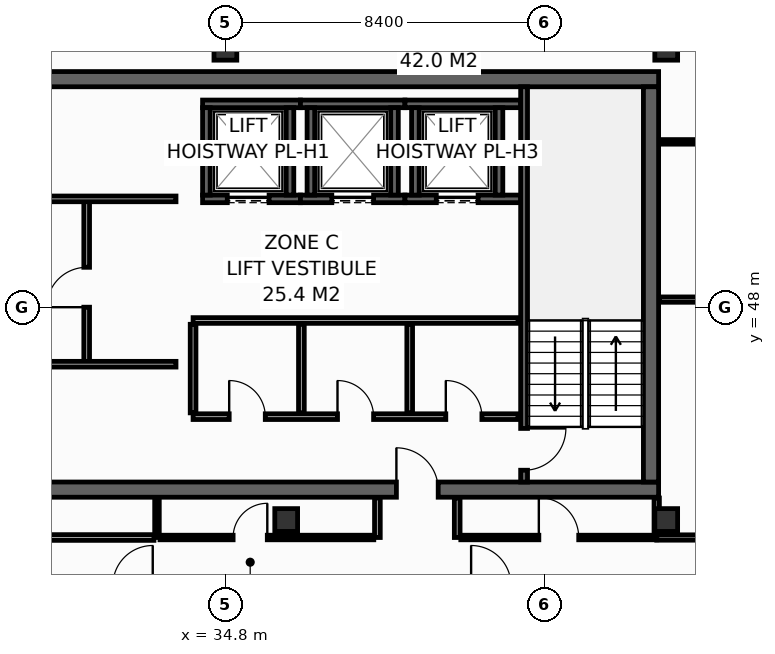
"""IFC4 building model, lengths in metres.
Left out: names, types, materials, properties, quantities, classifications, styles, units other than length and angle.
Written with IfcOpenShell. Run it as: python <this file> out.ifc"""

import sys

from ifc_helpers import new_model, si_unit, direction, frame, frame_2d, origin, origin_2d, place, context, subcontext, project, spatial, rectangle, hollow_rectangle, extrude, element, fill, save


model = new_model("IFC4")
c1 = context("Model", 3, precision=1e-05, world=origin(), true_north=direction((0.0, 1.0)))
c2 = subcontext(c1, "Body", "Model", "MODEL_VIEW")
j1 = project(units=[si_unit("LENGTHUNIT", "METRE"), si_unit("PLANEANGLEUNIT", "RADIAN")], contexts=[c1])
p1 = place(None, origin())
s1 = spatial("IfcSite", under=j1, at=p1, CompositionType="ELEMENT")
p2 = place(p1, origin())
s2 = spatial("IfcBuilding", under=s1, at=p2, CompositionType="ELEMENT")
p3 = place(p2, frame((0.0, 0.0, 295.2)))
s3 = spatial("IfcBuildingStorey", under=s2, at=p3, CompositionType="ELEMENT", Elevation=295.2)
p4 = place(p3, frame((13.7, 43.2, 0.0), z_axis=(0.0, 0.0, 1.0), x_axis=(1.0, 0.0, 0.0)))
e1 = element("IfcWall", 1, at=p4, inside=s3, PredefinedType="SHEAR", context=c2, shape_type="SweptSolid", body=[
    extrude(rectangle(XDim=32.5, YDim=0.4, at=frame_2d((16.25, 0.0))), origin(), (0.0, 0.0, 1.0), 3.55),
])
p5 = place(p4, frame((5.4, 0.0, 0.0)))
e2 = element("IfcOpeningElement", 2, at=p5, cuts=e1, PredefinedType="OPENING", context=c2, shape_type="SweptSolid", body=[
    extrude(rectangle(XDim=1.1, YDim=2.15, at=frame_2d((0.55, 1.075))), frame((0.0, 0.21, 0.0), z_axis=(0.0, -1.0, 0.0), x_axis=(1.0, 0.0, 0.0)), (0.0, 0.0, 1.0), 0.42),
])
p6 = place(p4, frame((25.6, 0.0, 0.0)))
e3 = element("IfcOpeningElement", 3, at=p6, cuts=e1, PredefinedType="OPENING", context=c2, shape_type="SweptSolid", body=[
    extrude(rectangle(XDim=1.1, YDim=2.15, at=frame_2d((0.55, 1.075))), frame((0.0, 0.21, 0.0), z_axis=(0.0, -1.0, 0.0), x_axis=(1.0, 0.0, 0.0)), (0.0, 0.0, 1.0), 0.42),
])
p7 = place(p3, frame((13.7, 54.0, 0.0), z_axis=(0.0, 0.0, 1.0), x_axis=(1.0, 0.0, 0.0)))
e4 = element("IfcWall", 4, at=p7, inside=s3, PredefinedType="SHEAR", context=c2, shape_type="SweptSolid", body=[
    extrude(rectangle(XDim=32.5, YDim=0.4, at=frame_2d((16.25, 0.0))), origin(), (0.0, 0.0, 1.0), 3.55),
])
p8 = place(p3, frame((46.0, 43.4, 0.0), z_axis=(0.0, 0.0, 1.0), x_axis=(0.0, 1.0, 0.0)))
e5 = element("IfcWall", 5, at=p8, inside=s3, PredefinedType="SHEAR", context=c2, shape_type="SweptSolid", body=[
    extrude(rectangle(XDim=10.4, YDim=0.4, at=frame_2d((5.2, 0.0))), origin(), (0.0, 0.0, 1.0), 3.55),
])
for number, where, z_axis, x_axis in (
    (6, (34.8, 54.8, 0.0), (0.0, 0.0, 1.0), (1.0, 0.0, 0.0)),
    (7, (46.4, 54.8, 0.0), (0.0, 0.0, 1.0), (1.0, 0.0, 0.0)),
    (8, (36.4, 42.4, 0.0), (0.0, 0.0, 1.0), (1.0, 0.0, 0.0)),
    (9, (46.4, 42.4, 0.0), (0.0, 0.0, 1.0), (1.0, 0.0, 0.0)),
):
    element("IfcColumn", number, at=place(p3, frame(where, z_axis=z_axis, x_axis=x_axis)), inside=s3, PredefinedType="COLUMN", context=c2, shape_type="SweptSolid", body=[
        extrude(hollow_rectangle(XDim=0.6, YDim=0.6, WallThickness=0.028, at=origin_2d()), origin(), (0.0, 0.0, 1.0), 3.8),
    ])
p9 = place(p3, frame((34.2, 50.85, 0.0), z_axis=(0.0, 0.0, 1.0), x_axis=(1.0, 0.0, 0.0)))
e10 = element("IfcWall", 10, at=p9, inside=s3, PredefinedType="SHEAR", context=c2, shape_type="SweptSolid", body=[
    extrude(rectangle(XDim=2.575, YDim=0.2, at=frame_2d((1.288, 0.0))), origin(), (0.0, 0.0, 1.0), 3.55),
])
p10 = place(p9, frame((0.65, 0.0, 0.0)))
e11 = element("IfcOpeningElement", 11, at=p10, cuts=e10, PredefinedType="OPENING", context=c2, shape_type="SweptSolid", body=[
    extrude(rectangle(XDim=1.1, YDim=2.2, at=frame_2d((0.55, 1.1))), frame((0.0, 0.11, 0.0), z_axis=(0.0, -1.0, 0.0), x_axis=(1.0, 0.0, 0.0)), (0.0, 0.0, 1.0), 0.22),
])
p11 = place(p3, frame((34.2, 53.35, 0.0), z_axis=(0.0, 0.0, 1.0), x_axis=(1.0, 0.0, 0.0)))
e12 = element("IfcWall", 12, at=p11, inside=s3, PredefinedType="SHEAR", context=c2, shape_type="SweptSolid", body=[
    extrude(rectangle(XDim=2.575, YDim=0.2, at=frame_2d((1.288, 0.0))), origin(), (0.0, 0.0, 1.0), 3.55),
])
for number, where, z_axis, x_axis in (
    (13, (34.3, 50.95, 0.0), (0.0, 0.0, 1.0), (0.0, 1.0, 0.0)),
    (14, (36.5, 50.95, 0.0), (0.0, 0.0, 1.0), (0.0, 1.0, 0.0)),
):
    element("IfcWall", number, at=place(p3, frame(where, z_axis=z_axis, x_axis=x_axis)), inside=s3, PredefinedType="SHEAR", context=c2, shape_type="SweptSolid", body=[
        extrude(rectangle(XDim=2.3, YDim=0.2, at=frame_2d((1.15, 0.0))), origin(), (0.0, 0.0, 1.0), 3.55),
    ])
p12 = place(p3, frame((36.775, 50.85, 0.0), z_axis=(0.0, 0.0, 1.0), x_axis=(1.0, 0.0, 0.0)))
e15 = element("IfcWall", 15, at=p12, inside=s3, PredefinedType="SHEAR", context=c2, shape_type="SweptSolid", body=[
    extrude(rectangle(XDim=2.75, YDim=0.2, at=frame_2d((1.375, 0.0))), origin(), (0.0, 0.0, 1.0), 3.55),
])
p13 = place(p12, frame((0.825, 0.0, 0.0)))
e16 = element("IfcOpeningElement", 16, at=p13, cuts=e15, PredefinedType="OPENING", context=c2, shape_type="SweptSolid", body=[
    extrude(rectangle(XDim=1.1, YDim=2.2, at=frame_2d((0.55, 1.1))), frame((0.0, 0.11, 0.0), z_axis=(0.0, -1.0, 0.0), x_axis=(1.0, 0.0, 0.0)), (0.0, 0.0, 1.0), 0.22),
])
p14 = place(p3, frame((36.775, 53.35, 0.0), z_axis=(0.0, 0.0, 1.0), x_axis=(1.0, 0.0, 0.0)))
e17 = element("IfcWall", 17, at=p14, inside=s3, PredefinedType="SHEAR", context=c2, shape_type="SweptSolid", body=[
    extrude(rectangle(XDim=2.75, YDim=0.2, at=frame_2d((1.375, 0.0))), origin(), (0.0, 0.0, 1.0), 3.55),
])
for number, where, z_axis, x_axis in (
    (18, (37.05, 50.95, 0.0), (0.0, 0.0, 1.0), (0.0, 1.0, 0.0)),
    (19, (39.25, 50.95, 0.0), (0.0, 0.0, 1.0), (0.0, 1.0, 0.0)),
):
    element("IfcWall", number, at=place(p3, frame(where, z_axis=z_axis, x_axis=x_axis)), inside=s3, PredefinedType="SHEAR", context=c2, shape_type="SweptSolid", body=[
        extrude(rectangle(XDim=2.3, YDim=0.2, at=frame_2d((1.15, 0.0))), origin(), (0.0, 0.0, 1.0), 3.55),
    ])
p15 = place(p3, frame((39.525, 50.85, 0.0), z_axis=(0.0, 0.0, 1.0), x_axis=(1.0, 0.0, 0.0)))
e20 = element("IfcWall", 20, at=p15, inside=s3, PredefinedType="SHEAR", context=c2, shape_type="SweptSolid", body=[
    extrude(rectangle(XDim=3.045, YDim=0.2, at=frame_2d((1.522, 0.0))), origin(), (0.0, 0.0, 1.0), 3.55),
])
p16 = place(p15, frame((0.825, 0.0, 0.0)))
e21 = element("IfcOpeningElement", 21, at=p16, cuts=e20, PredefinedType="OPENING", context=c2, shape_type="SweptSolid", body=[
    extrude(rectangle(XDim=1.1, YDim=2.2, at=frame_2d((0.55, 1.1))), frame((0.0, 0.11, 0.0), z_axis=(0.0, -1.0, 0.0), x_axis=(1.0, 0.0, 0.0)), (0.0, 0.0, 1.0), 0.22),
])
p17 = place(p3, frame((39.525, 53.35, 0.0), z_axis=(0.0, 0.0, 1.0), x_axis=(1.0, 0.0, 0.0)))
e22 = element("IfcWall", 22, at=p17, inside=s3, PredefinedType="SHEAR", context=c2, shape_type="SweptSolid", body=[
    extrude(rectangle(XDim=3.045, YDim=0.2, at=frame_2d((1.522, 0.0))), origin(), (0.0, 0.0, 1.0), 3.55),
])
for number, where, z_axis, x_axis in (
    (23, (39.8, 50.95, 0.0), (0.0, 0.0, 1.0), (0.0, 1.0, 0.0)),
    (24, (42.0, 50.95, 0.0), (0.0, 0.0, 1.0), (0.0, 1.0, 0.0)),
):
    element("IfcWall", number, at=place(p3, frame(where, z_axis=z_axis, x_axis=x_axis)), inside=s3, PredefinedType="SHEAR", context=c2, shape_type="SweptSolid", body=[
        extrude(rectangle(XDim=2.3, YDim=0.2, at=frame_2d((1.15, 0.0))), origin(), (0.0, 0.0, 1.0), 3.55),
    ])
p18 = place(p3, frame((42.66, 53.8, 0.0), z_axis=(0.0, 0.0, 1.0), x_axis=(0.0, -1.0, 0.0)))
e25 = element("IfcWall", 25, at=p18, inside=s3, PredefinedType="SHEAR", context=c2, shape_type="SweptSolid", body=[
    extrude(rectangle(XDim=10.4, YDim=0.18, at=frame_2d((5.2, 0.0))), origin(), (0.0, 0.0, 1.0), 3.55),
])
p19 = place(p18, frame((8.99, 0.0, 0.0)))
e26 = element("IfcOpeningElement", 26, at=p19, cuts=e25, PredefinedType="OPENING", context=c2, shape_type="SweptSolid", body=[
    extrude(rectangle(XDim=1.1, YDim=2.15, at=frame_2d((0.55, 1.075))), frame((0.0, 0.1, 0.0), z_axis=(0.0, -1.0, 0.0), x_axis=(1.0, 0.0, 0.0)), (0.0, 0.0, 1.0), 0.2),
])
p20 = place(p3, frame((31.15, 46.5, 0.0), z_axis=(0.0, 0.0, 1.0), x_axis=(0.0, 1.0, 0.0)))
e27 = element("IfcWall", 27, at=p20, inside=s3, PredefinedType="PARTITIONING", context=c2, shape_type="SweptSolid", body=[
    extrude(rectangle(XDim=4.35, YDim=0.15, at=frame_2d((2.175, 0.0))), origin(), (0.0, 0.0, 1.0), 3.55),
])
p21 = place(p20, frame((1.5, 0.0, 0.0)))
e28 = element("IfcOpeningElement", 28, at=p21, cuts=e27, PredefinedType="OPENING", context=c2, shape_type="SweptSolid", body=[
    extrude(rectangle(XDim=1.05, YDim=2.15, at=frame_2d((0.525, 1.075))), frame((0.0, 0.085, 0.0), z_axis=(0.0, -1.0, 0.0), x_axis=(1.0, 0.0, 0.0)), (0.0, 0.0, 1.0), 0.17),
])
p22 = place(p3, frame((33.95, 45.12, 0.0), z_axis=(0.0, 0.0, 1.0), x_axis=(1.0, 0.0, 0.0)))
e29 = element("IfcWall", 29, at=p22, inside=s3, PredefinedType="PARTITIONING", context=c2, shape_type="SweptSolid", body=[
    extrude(rectangle(XDim=8.55, YDim=0.15, at=frame_2d((4.275, 0.0))), origin(), (0.0, 0.0, 1.0), 3.55),
])
p23 = place(p22, frame((0.95, 0.0, 0.0)))
e30 = element("IfcOpeningElement", 30, at=p23, cuts=e29, PredefinedType="OPENING", context=c2, shape_type="SweptSolid", body=[
    extrude(rectangle(XDim=0.95, YDim=2.15, at=frame_2d((0.475, 1.075))), frame((0.0, 0.085, 0.0), z_axis=(0.0, -1.0, 0.0), x_axis=(1.0, 0.0, 0.0)), (0.0, 0.0, 1.0), 0.17),
])
p24 = place(p22, frame((3.8, 0.0, 0.0)))
e31 = element("IfcOpeningElement", 31, at=p24, cuts=e29, PredefinedType="OPENING", context=c2, shape_type="SweptSolid", body=[
    extrude(rectangle(XDim=0.95, YDim=2.15, at=frame_2d((0.475, 1.075))), frame((0.0, 0.085, 0.0), z_axis=(0.0, -1.0, 0.0), x_axis=(1.0, 0.0, 0.0)), (0.0, 0.0, 1.0), 0.17),
])
p25 = place(p22, frame((6.65, 0.0, 0.0)))
e32 = element("IfcOpeningElement", 32, at=p25, cuts=e29, PredefinedType="OPENING", context=c2, shape_type="SweptSolid", body=[
    extrude(rectangle(XDim=0.95, YDim=2.15, at=frame_2d((0.475, 1.075))), frame((0.0, 0.085, 0.0), z_axis=(0.0, -1.0, 0.0), x_axis=(1.0, 0.0, 0.0)), (0.0, 0.0, 1.0), 0.17),
])
p26 = place(p3, frame((33.95, 47.65, 0.0), z_axis=(0.0, 0.0, 1.0), x_axis=(1.0, 0.0, 0.0)))
e33 = element("IfcWall", 33, at=p26, inside=s3, PredefinedType="PARTITIONING", context=c2, shape_type="SweptSolid", body=[
    extrude(rectangle(XDim=8.55, YDim=0.15, at=frame_2d((4.275, 0.0))), origin(), (0.0, 0.0, 1.0), 3.55),
])
for number, where, z_axis, x_axis in (
    (34, (33.95, 45.22, 0.0), (0.0, 0.0, 1.0), (0.0, 1.0, 0.0)),
    (35, (36.8, 45.22, 0.0), (0.0, 0.0, 1.0), (0.0, 1.0, 0.0)),
    (36, (39.65, 45.22, 0.0), (0.0, 0.0, 1.0), (0.0, 1.0, 0.0)),
):
    element("IfcWall", number, at=place(p3, frame(where, z_axis=z_axis, x_axis=x_axis)), inside=s3, PredefinedType="PARTITIONING", context=c2, shape_type="SweptSolid", body=[
        extrude(rectangle(XDim=2.33, YDim=0.15, at=frame_2d((1.165, 0.0))), origin(), (0.0, 0.0, 1.0), 3.55),
    ])
p27 = place(p3, frame((25.85, 50.85, 0.0), z_axis=(0.0, 0.0, 1.0), x_axis=(1.0, 0.0, 0.0)))
e37 = element("IfcWall", 37, at=p27, inside=s3, PredefinedType="PARTITIONING", context=c2, shape_type="SweptSolid", body=[
    extrude(rectangle(XDim=7.65, YDim=0.15, at=frame_2d((3.825, 0.0))), origin(), (0.0, 0.0, 1.0), 3.55),
])
p28 = place(p27, frame((1.25, 0.0, 0.0)))
e38 = element("IfcOpeningElement", 38, at=p28, cuts=e37, PredefinedType="OPENING", context=c2, shape_type="SweptSolid", body=[
    extrude(rectangle(XDim=0.95, YDim=2.15, at=frame_2d((0.475, 1.075))), frame((0.0, 0.085, 0.0), z_axis=(0.0, -1.0, 0.0), x_axis=(1.0, 0.0, 0.0)), (0.0, 0.0, 1.0), 0.17),
])
p29 = place(p3, frame((25.85, 46.5, 0.0), z_axis=(0.0, 0.0, 1.0), x_axis=(1.0, 0.0, 0.0)))
e39 = element("IfcWall", 39, at=p29, inside=s3, PredefinedType="PARTITIONING", context=c2, shape_type="SweptSolid", body=[
    extrude(rectangle(XDim=7.65, YDim=0.15, at=frame_2d((3.825, 0.0))), origin(), (0.0, 0.0, 1.0), 3.55),
])
p30 = place(p29, frame((2.8, 0.0, 0.0)))
e40 = element("IfcOpeningElement", 40, at=p30, cuts=e39, PredefinedType="OPENING", context=c2, shape_type="SweptSolid", body=[
    extrude(rectangle(XDim=0.95, YDim=2.15, at=frame_2d((0.475, 1.075))), frame((0.0, 0.085, 0.0), z_axis=(0.0, -1.0, 0.0), x_axis=(1.0, 0.0, 0.0)), (0.0, 0.0, 1.0), 0.17),
])
p31 = place(p3, frame((46.15, 41.94, 0.0), z_axis=(0.0, 0.0, 1.0), x_axis=(1.0, 0.0, 0.0)))
e41 = element("IfcWall", 41, at=p31, inside=s3, PredefinedType="PARTITIONING", context=c2, shape_type="SweptSolid", body=[
    extrude(rectangle(XDim=4.05, YDim=0.14, at=frame_2d((2.025, 0.0))), origin(), (0.0, 0.0, 1.0), 3.55),
])
p32 = place(p3, frame((46.15, 42.03, 0.0), z_axis=(0.0, 0.0, 1.0), x_axis=(0.0, 1.0, 0.0)))
e42 = element("IfcWall", 42, at=p32, inside=s3, PredefinedType="PARTITIONING", context=c2, shape_type="SweptSolid", body=[
    extrude(rectangle(XDim=0.95, YDim=0.14, at=frame_2d((0.475, 0.0))), origin(), (0.0, 0.0, 1.0), 3.55),
])
p33 = place(p3, frame((46.22, 48.2, 0.0), z_axis=(0.0, 0.0, 1.0), x_axis=(1.0, 0.0, 0.0)))
e43 = element("IfcWall", 43, at=p33, inside=s3, PredefinedType="PARTITIONING", context=c2, shape_type="SweptSolid", body=[
    extrude(rectangle(XDim=3.98, YDim=0.14, at=frame_2d((1.99, 0.0))), origin(), (0.0, 0.0, 1.0), 3.55),
])
p34 = place(p3, frame((46.22, 52.35, 0.0), z_axis=(0.0, 0.0, 1.0), x_axis=(1.0, 0.0, 0.0)))
e44 = element("IfcWall", 44, at=p34, inside=s3, PredefinedType="PARTITIONING", context=c2, shape_type="SweptSolid", body=[
    extrude(rectangle(XDim=3.98, YDim=0.12, at=frame_2d((1.99, 0.0))), origin(), (0.0, 0.0, 1.0), 3.55),
])
for number, where, z_axis, x_axis in (
    (45, (38.8, 41.94, 0.0), (0.0, 0.0, 1.0), (0.0, 1.0, 0.0)),
    (46, (40.9, 41.94, 0.0), (0.0, 0.0, 1.0), (0.0, 1.0, 0.0)),
):
    element("IfcWall", number, at=place(p3, frame(where, z_axis=z_axis, x_axis=x_axis)), inside=s3, PredefinedType="PARTITIONING", context=c2, shape_type="SweptSolid", body=[
        extrude(rectangle(XDim=1.04, YDim=0.15, at=frame_2d((0.52, 0.0))), origin(), (0.0, 0.0, 1.0), 3.55),
    ])
p35 = place(p3, frame((33.0, 41.94, 0.0), z_axis=(0.0, 0.0, 1.0), x_axis=(0.0, 1.0, 0.0)))
e47 = element("IfcWall", 47, at=p35, inside=s3, PredefinedType="PARTITIONING", context=c2, shape_type="SweptSolid", body=[
    extrude(rectangle(XDim=1.04, YDim=0.12, at=frame_2d((0.52, 0.0))), origin(), (0.0, 0.0, 1.0), 2.947),
])
p36 = place(p3, frame((20.795, 41.94, 0.0), z_axis=(0.0, 0.0, 1.0), x_axis=(1.0, 0.0, 0.0)))
e48 = element("IfcWall", 48, at=p36, inside=s3, PredefinedType="PARTITIONING", context=c2, shape_type="SweptSolid", body=[
    extrude(rectangle(XDim=12.125, YDim=0.15, at=frame_2d((6.062, 0.0))), origin(), (0.0, 0.0, 1.0), 3.047),
])
p37 = place(p36, frame((5.537, 0.0, 0.0)))
e49 = element("IfcOpeningElement", 49, at=p37, cuts=e48, PredefinedType="OPENING", context=c2, shape_type="SweptSolid", body=[
    extrude(rectangle(XDim=1.05, YDim=2.15, at=frame_2d((0.525, 1.075))), frame((0.0, 0.085, 0.0), z_axis=(0.0, -1.0, 0.0), x_axis=(1.0, 0.0, 0.0)), (0.0, 0.0, 1.0), 0.17),
])
p38 = place(p3, frame((33.08, 41.94, 0.0), z_axis=(0.0, 0.0, 1.0), x_axis=(1.0, 0.0, 0.0)))
e50 = element("IfcWall", 50, at=p38, inside=s3, PredefinedType="PARTITIONING", context=c2, shape_type="SweptSolid", body=[
    extrude(rectangle(XDim=5.625, YDim=0.12, at=frame_2d((2.812, 0.0))), origin(), (0.0, 0.0, 1.0), 3.047),
])
p39 = place(p38, frame((1.923, 0.0, 0.0)))
e51 = element("IfcOpeningElement", 51, at=p39, cuts=e50, PredefinedType="OPENING", context=c2, shape_type="SweptSolid", body=[
    extrude(rectangle(XDim=0.9, YDim=2.1, at=frame_2d((0.45, 1.05))), frame((0.0, 0.07, 0.0), z_axis=(0.0, -1.0, 0.0), x_axis=(1.0, 0.0, 0.0)), (0.0, 0.0, 1.0), 0.14),
])
p40 = place(p3, frame((40.995, 41.94, 0.0), z_axis=(0.0, 0.0, 1.0), x_axis=(1.0, 0.0, 0.0)))
e52 = element("IfcWall", 52, at=p40, inside=s3, PredefinedType="PARTITIONING", context=c2, shape_type="SweptSolid", body=[
    extrude(rectangle(XDim=5.155, YDim=0.12, at=frame_2d((2.577, 0.0))), origin(), (0.0, 0.0, 1.0), 3.55),
])
p41 = place(p40, frame((2.053, 0.0, 0.0)))
e53 = element("IfcOpeningElement", 53, at=p41, cuts=e52, PredefinedType="OPENING", context=c2, shape_type="SweptSolid", body=[
    extrude(rectangle(XDim=1.05, YDim=2.15, at=frame_2d((0.525, 1.075))), frame((0.0, 0.07, 0.0), z_axis=(0.0, -1.0, 0.0), x_axis=(1.0, 0.0, 0.0)), (0.0, 0.0, 1.0), 0.14),
])
p42 = place(p10, origin())
e54 = element("IfcDoor", 54, at=p42, inside=s3, OperationType="SLIDING_TO_LEFT", PredefinedType="DOOR", context=c2, shape_type="SweptSolid", body=[
    extrude(rectangle(XDim=1.1, YDim=2.2, at=frame_2d((0.55, 1.1))), frame((0.0, 0.025, 0.0), z_axis=(0.0, -1.0, 0.0), x_axis=(1.0, 0.0, 0.0)), (0.0, 0.0, 1.0), 0.05),
])
fill(e11, e54)
p43 = place(p13, origin())
e55 = element("IfcDoor", 55, at=p43, inside=s3, OperationType="SLIDING_TO_LEFT", PredefinedType="DOOR", context=c2, shape_type="SweptSolid", body=[
    extrude(rectangle(XDim=1.1, YDim=2.2, at=frame_2d((0.55, 1.1))), frame((0.0, 0.025, 0.0), z_axis=(0.0, -1.0, 0.0), x_axis=(1.0, 0.0, 0.0)), (0.0, 0.0, 1.0), 0.05),
])
fill(e16, e55)
p44 = place(p16, origin())
e56 = element("IfcDoor", 56, at=p44, inside=s3, OperationType="SLIDING_TO_LEFT", PredefinedType="DOOR", context=c2, shape_type="SweptSolid", body=[
    extrude(rectangle(XDim=1.1, YDim=2.2, at=frame_2d((0.55, 1.1))), frame((0.0, 0.025, 0.0), z_axis=(0.0, -1.0, 0.0), x_axis=(1.0, 0.0, 0.0)), (0.0, 0.0, 1.0), 0.05),
])
fill(e21, e56)
p45 = place(p19, origin())
e57 = element("IfcDoor", 57, at=p45, inside=s3, OperationType="SINGLE_SWING_LEFT", PredefinedType="DOOR", context=c2, shape_type="SweptSolid", body=[
    extrude(rectangle(XDim=1.1, YDim=2.15, at=frame_2d((0.55, 1.075))), frame((0.0, 0.025, 0.0), z_axis=(0.0, -1.0, 0.0), x_axis=(1.0, 0.0, 0.0)), (0.0, 0.0, 1.0), 0.05),
])
fill(e26, e57)
p46 = place(p6, origin())
e58 = element("IfcDoor", 58, at=p46, inside=s3, OperationType="SINGLE_SWING_LEFT", PredefinedType="DOOR", context=c2, shape_type="SweptSolid", body=[
    extrude(rectangle(XDim=1.1, YDim=2.15, at=frame_2d((0.55, 1.075))), frame((0.0, 0.025, 0.0), z_axis=(0.0, -1.0, 0.0), x_axis=(1.0, 0.0, 0.0)), (0.0, 0.0, 1.0), 0.05),
])
fill(e3, e58)
p47 = place(p21, origin())
e59 = element("IfcDoor", 59, at=p47, inside=s3, OperationType="SINGLE_SWING_LEFT", PredefinedType="DOOR", context=c2, shape_type="SweptSolid", body=[
    extrude(rectangle(XDim=1.05, YDim=2.15, at=frame_2d((0.525, 1.075))), frame((0.0, 0.025, 0.0), z_axis=(0.0, -1.0, 0.0), x_axis=(1.0, 0.0, 0.0)), (0.0, 0.0, 1.0), 0.05),
])
fill(e28, e59)
p48 = place(p23, origin())
e60 = element("IfcDoor", 60, at=p48, inside=s3, OperationType="SINGLE_SWING_LEFT", PredefinedType="DOOR", context=c2, shape_type="SweptSolid", body=[
    extrude(rectangle(XDim=0.95, YDim=2.15, at=frame_2d((0.475, 1.075))), frame((0.0, 0.025, 0.0), z_axis=(0.0, -1.0, 0.0), x_axis=(1.0, 0.0, 0.0)), (0.0, 0.0, 1.0), 0.05),
])
fill(e30, e60)
p49 = place(p24, origin())
e61 = element("IfcDoor", 61, at=p49, inside=s3, OperationType="SINGLE_SWING_LEFT", PredefinedType="DOOR", context=c2, shape_type="SweptSolid", body=[
    extrude(rectangle(XDim=0.95, YDim=2.15, at=frame_2d((0.475, 1.075))), frame((0.0, 0.025, 0.0), z_axis=(0.0, -1.0, 0.0), x_axis=(1.0, 0.0, 0.0)), (0.0, 0.0, 1.0), 0.05),
])
fill(e31, e61)
p50 = place(p25, origin())
e62 = element("IfcDoor", 62, at=p50, inside=s3, OperationType="SINGLE_SWING_LEFT", PredefinedType="DOOR", context=c2, shape_type="SweptSolid", body=[
    extrude(rectangle(XDim=0.95, YDim=2.15, at=frame_2d((0.475, 1.075))), frame((0.0, 0.025, 0.0), z_axis=(0.0, -1.0, 0.0), x_axis=(1.0, 0.0, 0.0)), (0.0, 0.0, 1.0), 0.05),
])
fill(e32, e62)
p51 = place(p39, origin())
e63 = element("IfcDoor", 63, at=p51, inside=s3, OperationType="SINGLE_SWING_RIGHT", PredefinedType="DOOR", context=c2, shape_type="SweptSolid", body=[
    extrude(rectangle(XDim=0.9, YDim=2.1, at=frame_2d((0.45, 1.05))), frame((0.0, 0.025, 0.0), z_axis=(0.0, -1.0, 0.0), x_axis=(1.0, 0.0, 0.0)), (0.0, 0.0, 1.0), 0.05),
])
fill(e51, e63)
p52 = place(p41, origin())
e64 = element("IfcDoor", 64, at=p52, inside=s3, OperationType="SINGLE_SWING_LEFT", PredefinedType="DOOR", context=c2, shape_type="SweptSolid", body=[
    extrude(rectangle(XDim=1.05, YDim=2.15, at=frame_2d((0.525, 1.075))), frame((0.0, 0.025, 0.0), z_axis=(0.0, -1.0, 0.0), x_axis=(1.0, 0.0, 0.0)), (0.0, 0.0, 1.0), 0.05),
])
fill(e53, e64)
save(model, sys.argv[1])
